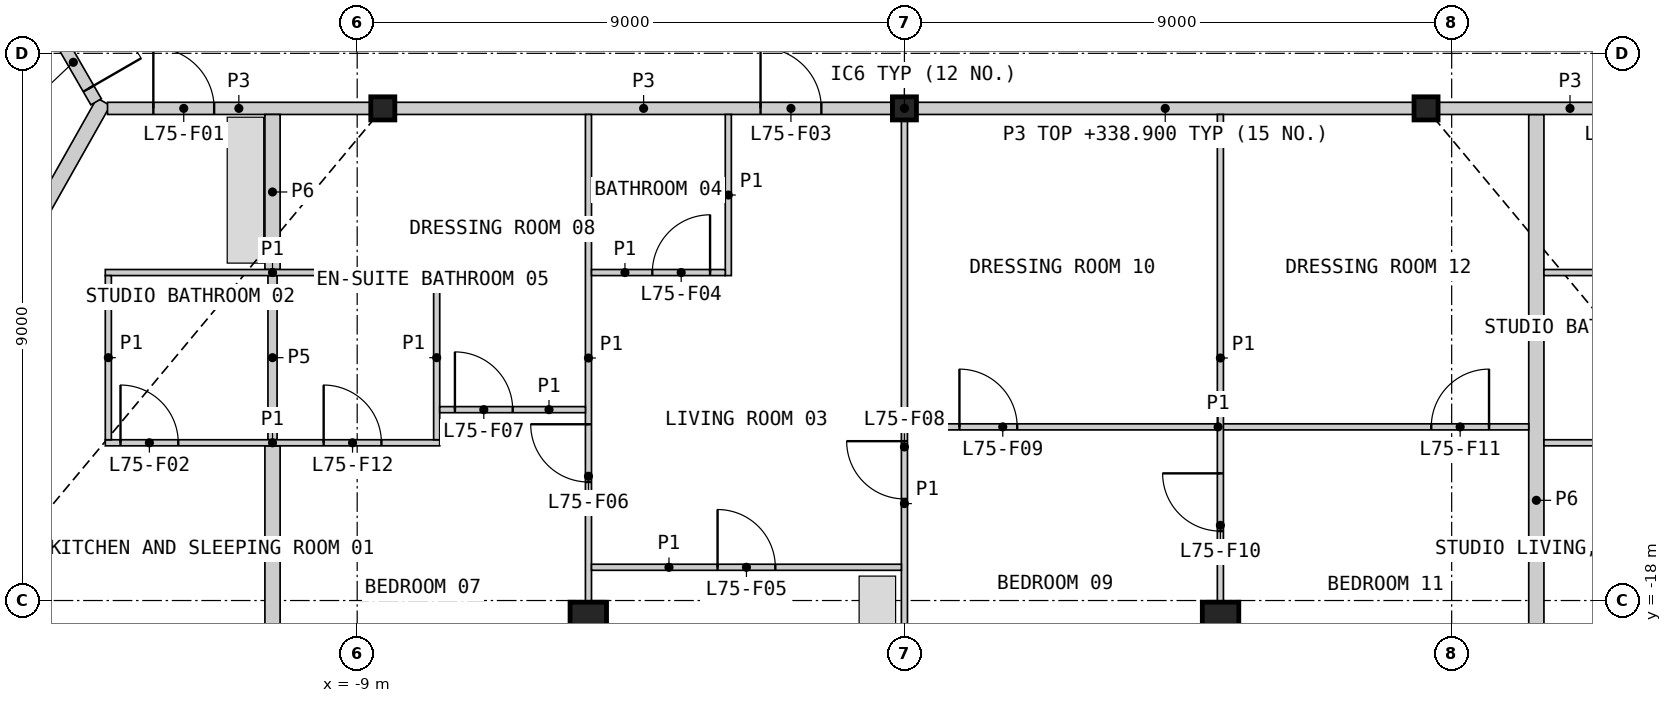
"""IFC4 building model, lengths in metres.
Left out: names, types, materials, properties, quantities, classifications, styles, units other than length and angle.
Written with IfcOpenShell. Run it as: python <this file> out.ifc"""

import sys

from ifc_helpers import new_model, si_unit, direction, frame, frame_2d, origin, origin_2d, place, context, subcontext, project, spatial, rectangle, hollow_rectangle, i_section, extrude, element, fill, save


model = new_model("IFC4")
c1 = context("Model", 3, precision=1e-05, world=origin(), true_north=direction((0.0, 1.0)))
c2 = subcontext(c1, "Body", "Model", "MODEL_VIEW")
j1 = project(units=[si_unit("LENGTHUNIT", "METRE"), si_unit("PLANEANGLEUNIT", "RADIAN")], contexts=[c1])
p1 = place(None, origin())
s1 = spatial("IfcSite", under=j1, at=p1, CompositionType="ELEMENT")
p2 = place(p1, origin())
s2 = spatial("IfcBuilding", under=s1, at=p2, CompositionType="ELEMENT")
p3 = place(p2, frame((0.0, 0.0, 335.8)))
s3 = spatial("IfcBuildingStorey", under=s2, at=p3, CompositionType="ELEMENT", Elevation=335.8)
for number, where, z_axis, x_axis in (
    (1, (-5.199, -18.327, 0.0), (0.0, 0.0, 1.0), (1.0, 0.0, 0.0)),
    (2, (5.199, -18.327, 0.0), (0.0, 0.0, 1.0), (1.0, 0.0, 0.0)),
):
    element("IfcColumn", number, at=place(p3, frame(where, z_axis=z_axis, x_axis=x_axis)), inside=s3, PredefinedType="COLUMN", context=c2, shape_type="SweptSolid", body=[
        extrude(hollow_rectangle(XDim=0.6, YDim=0.6, WallThickness=0.04, at=origin_2d()), origin(), (0.0, 0.0, 1.0), 3.4),
    ])
for number, where, z_axis, x_axis in (
    (3, (-8.578, -9.906, 0.0), (0.0, 0.0, 1.0), (1.0, 0.0, 0.0)),
    (4, (0.0, -9.906, 0.0), (0.0, 0.0, 1.0), (1.0, 0.0, 0.0)),
    (5, (8.578, -9.906, 0.0), (0.0, 0.0, 1.0), (1.0, 0.0, 0.0)),
):
    element("IfcColumn", number, at=place(p3, frame(where, z_axis=z_axis, x_axis=x_axis)), inside=s3, PredefinedType="COLUMN", context=c2, shape_type="SweptSolid", body=[
        extrude(i_section(OverallWidth=0.396, OverallDepth=0.381, WebThickness=0.019, FlangeThickness=0.03, at=origin_2d()), origin(), (0.0, 0.0, 1.0), 3.4),
    ])
p4 = place(p3, frame((-20.376, -22.582, 0.0), z_axis=(0.0, 0.0, 1.0), x_axis=(0.491057132664, 0.871127368678, 0.0)))
e6 = element("IfcWall", 6, at=p4, inside=s3, PredefinedType="PARTITIONING", context=c2, shape_type="SweptSolid", body=[
    extrude(rectangle(XDim=14.677, YDim=0.25, at=frame_2d((7.338, 0.0))), origin(), (0.0, 0.0, 1.0), 2.33),
])
p5 = place(p3, frame((10.393, -22.698, 0.0), z_axis=(0.0, 0.0, 1.0), x_axis=(0.0, 1.0, 0.0)))
e7 = element("IfcWall", 7, at=p5, inside=s3, PredefinedType="PARTITIONING", context=c2, shape_type="SweptSolid", body=[
    extrude(rectangle(XDim=12.692, YDim=0.25, at=frame_2d((6.346, 0.0))), origin(), (0.0, 0.0, 1.0), 2.33),
])
p6 = place(p3, frame((0.208, -9.906, 0.0), z_axis=(0.0, 0.0, 1.0), x_axis=(1.0, 0.0, 0.0)))
e8 = element("IfcWall", 8, at=p6, inside=s3, PredefinedType="PARTITIONING", context=c2, shape_type="SweptSolid", body=[
    extrude(rectangle(XDim=8.163, YDim=0.2, at=frame_2d((4.082, 0.0))), origin(), (0.0, 0.0, 1.0), 3.1),
])
p7 = place(p3, frame((-8.371, -9.906, 0.0), z_axis=(0.0, 0.0, 1.0), x_axis=(1.0, 0.0, 0.0)))
e9 = element("IfcWall", 9, at=p7, inside=s3, PredefinedType="PARTITIONING", context=c2, shape_type="SweptSolid", body=[
    extrude(rectangle(XDim=8.163, YDim=0.2, at=frame_2d((4.082, 0.0))), origin(), (0.0, 0.0, 1.0), 3.1),
])
p8 = place(p7, frame((6.004, 0.0, 0.0)))
e10 = element("IfcOpeningElement", 10, at=p8, cuts=e9, PredefinedType="OPENING", context=c2, shape_type="SweptSolid", body=[
    extrude(rectangle(XDim=1.0, YDim=2.1, at=frame_2d((0.5, 1.05))), frame((0.0, 0.11, 0.0), z_axis=(0.0, -1.0, 0.0), x_axis=(1.0, 0.0, 0.0)), (0.0, 0.0, 1.0), 0.22),
])
p9 = place(p3, frame((-10.393, -22.698, 0.0), z_axis=(0.0, 0.0, 1.0), x_axis=(0.0, 1.0, 0.0)))
e11 = element("IfcWall", 11, at=p9, inside=s3, PredefinedType="PARTITIONING", context=c2, shape_type="SweptSolid", body=[
    extrude(rectangle(XDim=7.242, YDim=0.25, at=frame_2d((3.621, 0.0))), origin(), (0.0, 0.0, 1.0), 2.33),
])
p10 = place(p3, frame((-13.106, -9.906, 0.0), z_axis=(0.0, 0.0, 1.0), x_axis=(1.0, 0.0, 0.0)))
e12 = element("IfcWall", 12, at=p10, inside=s3, PredefinedType="PARTITIONING", context=c2, shape_type="SweptSolid", body=[
    extrude(rectangle(XDim=4.32, YDim=0.2, at=frame_2d((2.16, 0.0))), origin(), (0.0, 0.0, 1.0), 3.1),
])
p11 = place(p10, frame((0.753, 0.0, 0.0)))
e13 = element("IfcOpeningElement", 13, at=p11, cuts=e12, PredefinedType="OPENING", context=c2, shape_type="SweptSolid", body=[
    extrude(rectangle(XDim=1.0, YDim=2.1, at=frame_2d((0.5, 1.05))), frame((0.0, 0.11, 0.0), z_axis=(0.0, -1.0, 0.0), x_axis=(1.0, 0.0, 0.0)), (0.0, 0.0, 1.0), 0.22),
])
p12 = place(p3, frame((8.786, -9.906, 0.0), z_axis=(0.0, 0.0, 1.0), x_axis=(1.0, 0.0, 0.0)))
e14 = element("IfcWall", 14, at=p12, inside=s3, PredefinedType="PARTITIONING", context=c2, shape_type="SweptSolid", body=[
    extrude(rectangle(XDim=4.32, YDim=0.2, at=frame_2d((2.16, 0.0))), origin(), (0.0, 0.0, 1.0), 3.1),
])
p13 = place(p12, frame((2.566, 0.0, 0.0)))
e15 = element("IfcOpeningElement", 15, at=p13, cuts=e14, PredefinedType="OPENING", context=c2, shape_type="SweptSolid", body=[
    extrude(rectangle(XDim=1.0, YDim=2.1, at=frame_2d((0.5, 1.05))), frame((0.0, 0.11, 0.0), z_axis=(0.0, -1.0, 0.0), x_axis=(1.0, 0.0, 0.0)), (0.0, 0.0, 1.0), 0.22),
])
p14 = place(p3, frame((-15.131, -6.614, 0.0), z_axis=(0.0, 0.0, 1.0), x_axis=(0.499967746641, -0.866044024469, 0.0)))
e16 = element("IfcWall", 16, at=p14, inside=s3, PredefinedType="PARTITIONING", context=c2, shape_type="SweptSolid", body=[
    extrude(rectangle(XDim=3.676, YDim=0.2, at=frame_2d((1.838, 0.0))), origin(), (0.0, 0.0, 1.0), 3.1),
])
p15 = place(p14, frame((2.426, 0.0, 0.0)))
e17 = element("IfcOpeningElement", 17, at=p15, cuts=e16, PredefinedType="OPENING", context=c2, shape_type="SweptSolid", body=[
    extrude(rectangle(XDim=1.0, YDim=2.1, at=frame_2d((0.5, 1.05))), frame((0.0, 0.11, 0.0), z_axis=(0.0, -1.0, 0.0), x_axis=(1.0, 0.0, 0.0)), (0.0, 0.0, 1.0), 0.22),
])
p16 = place(p3, frame((-10.393, -12.556, 0.0), z_axis=(0.0, 0.0, 1.0), x_axis=(0.0, 1.0, 0.0)))
e18 = element("IfcWall", 18, at=p16, inside=s3, PredefinedType="PARTITIONING", context=c2, shape_type="SweptSolid", body=[
    extrude(rectangle(XDim=2.55, YDim=0.25, at=frame_2d((1.275, 0.0))), origin(), (0.0, 0.0, 1.0), 2.33),
])
p17 = place(p3, frame((-10.393, -15.356, 0.0), z_axis=(0.0, 0.0, 1.0), x_axis=(0.0, 1.0, 0.0)))
e19 = element("IfcWall", 19, at=p17, inside=s3, PredefinedType="PLUMBINGWALL", context=c2, shape_type="SweptSolid", body=[
    extrude(rectangle(XDim=2.7, YDim=0.15, at=frame_2d((1.35, 0.0))), origin(), (0.0, 0.0, 1.0), 2.33),
])
p18 = place(p3, frame((0.0, -22.698, 0.0), z_axis=(0.0, 0.0, 1.0), x_axis=(0.0, 1.0, 0.0)))
e20 = element("IfcWall", 20, at=p18, inside=s3, PredefinedType="PARTITIONING", context=c2, shape_type="SweptSolid", body=[
    extrude(rectangle(XDim=12.585, YDim=0.1, at=frame_2d((6.292, 0.0))), origin(), (0.0, 0.0, 1.0), 2.33),
])
p19 = place(p18, frame((6.369, 0.0, 0.0)))
e21 = element("IfcOpeningElement", 21, at=p19, cuts=e20, PredefinedType="OPENING", context=c2, shape_type="SweptSolid", body=[
    extrude(rectangle(XDim=0.95, YDim=2.1, at=frame_2d((0.475, 1.05))), frame((0.0, 0.06, 0.0), z_axis=(0.0, -1.0, 0.0), x_axis=(1.0, 0.0, 0.0)), (0.0, 0.0, 1.0), 0.12),
])
p20 = place(p3, frame((0.05, -15.144, 0.0), z_axis=(0.0, 0.0, 1.0), x_axis=(1.0, 0.0, 0.0)))
e22 = element("IfcWall", 22, at=p20, inside=s3, PredefinedType="PARTITIONING", context=c2, shape_type="SweptSolid", body=[
    extrude(rectangle(XDim=10.218, YDim=0.1, at=frame_2d((5.109, 0.0))), origin(), (0.0, 0.0, 1.0), 2.33),
])
p21 = place(p20, frame((0.855, 0.0, 0.0)))
e23 = element("IfcOpeningElement", 23, at=p21, cuts=e22, PredefinedType="OPENING", context=c2, shape_type="SweptSolid", body=[
    extrude(rectangle(XDim=0.95, YDim=2.1, at=frame_2d((0.475, 1.05))), frame((0.0, 0.06, 0.0), z_axis=(0.0, -1.0, 0.0), x_axis=(1.0, 0.0, 0.0)), (0.0, 0.0, 1.0), 0.12),
])
p22 = place(p20, frame((8.615, 0.0, 0.0)))
e24 = element("IfcOpeningElement", 24, at=p22, cuts=e22, PredefinedType="OPENING", context=c2, shape_type="SweptSolid", body=[
    extrude(rectangle(XDim=0.95, YDim=2.1, at=frame_2d((0.475, 1.05))), frame((0.0, 0.06, 0.0), z_axis=(0.0, -1.0, 0.0), x_axis=(1.0, 0.0, 0.0)), (0.0, 0.0, 1.0), 0.12),
])
p23 = place(p3, frame((-5.196, -18.017, 0.0), z_axis=(0.0, 0.0, 1.0), x_axis=(0.0, 1.0, 0.0)))
e25 = element("IfcWall", 25, at=p23, inside=s3, PredefinedType="PARTITIONING", context=c2, shape_type="SweptSolid", body=[
    extrude(rectangle(XDim=8.011, YDim=0.1, at=frame_2d((4.006, 0.0))), origin(), (0.0, 0.0, 1.0), 2.33),
])
p24 = place(p23, frame((1.966, 0.0, 0.0)))
e26 = element("IfcOpeningElement", 26, at=p24, cuts=e25, PredefinedType="OPENING", context=c2, shape_type="SweptSolid", body=[
    extrude(rectangle(XDim=0.95, YDim=2.1, at=frame_2d((0.475, 1.05))), frame((0.0, 0.06, 0.0), z_axis=(0.0, -1.0, 0.0), x_axis=(1.0, 0.0, 0.0)), (0.0, 0.0, 1.0), 0.12),
])
p25 = place(p3, frame((5.196, -18.017, 0.0), z_axis=(0.0, 0.0, 1.0), x_axis=(0.0, 1.0, 0.0)))
e27 = element("IfcWall", 27, at=p25, inside=s3, PredefinedType="PARTITIONING", context=c2, shape_type="SweptSolid", body=[
    extrude(rectangle(XDim=8.011, YDim=0.1, at=frame_2d((4.006, 0.0))), origin(), (0.0, 0.0, 1.0), 2.33),
])
p26 = place(p25, frame((1.158, 0.0, 0.0)))
e28 = element("IfcOpeningElement", 28, at=p26, cuts=e27, PredefinedType="OPENING", context=c2, shape_type="SweptSolid", body=[
    extrude(rectangle(XDim=0.95, YDim=2.1, at=frame_2d((0.475, 1.05))), frame((0.0, 0.06, 0.0), z_axis=(0.0, -1.0, 0.0), x_axis=(1.0, 0.0, 0.0)), (0.0, 0.0, 1.0), 0.12),
])
p27 = place(p3, frame((-13.143, -12.606, 0.0), z_axis=(0.0, 0.0, 1.0), x_axis=(1.0, 0.0, 0.0)))
e29 = element("IfcWall", 29, at=p27, inside=s3, PredefinedType="PARTITIONING", context=c2, shape_type="SweptSolid", body=[
    extrude(rectangle(XDim=5.5, YDim=0.1, at=frame_2d((2.75, 0.0))), origin(), (0.0, 0.0, 1.0), 2.33),
])
p28 = place(p3, frame((-13.143, -15.406, 0.0), z_axis=(0.0, 0.0, 1.0), x_axis=(1.0, 0.0, 0.0)))
e30 = element("IfcWall", 30, at=p28, inside=s3, PredefinedType="PARTITIONING", context=c2, shape_type="SweptSolid", body=[
    extrude(rectangle(XDim=5.5, YDim=0.1, at=frame_2d((2.75, 0.0))), origin(), (0.0, 0.0, 1.0), 2.33),
])
p29 = place(p28, frame((0.25, 0.0, 0.0)))
e31 = element("IfcOpeningElement", 31, at=p29, cuts=e30, PredefinedType="OPENING", context=c2, shape_type="SweptSolid", body=[
    extrude(rectangle(XDim=0.95, YDim=2.1, at=frame_2d((0.475, 1.05))), frame((0.0, 0.06, 0.0), z_axis=(0.0, -1.0, 0.0), x_axis=(1.0, 0.0, 0.0)), (0.0, 0.0, 1.0), 0.12),
])
p30 = place(p28, frame((3.591, 0.0, 0.0)))
e32 = element("IfcOpeningElement", 32, at=p30, cuts=e30, PredefinedType="OPENING", context=c2, shape_type="SweptSolid", body=[
    extrude(rectangle(XDim=0.95, YDim=2.1, at=frame_2d((0.475, 1.05))), frame((0.0, 0.06, 0.0), z_axis=(0.0, -1.0, 0.0), x_axis=(1.0, 0.0, 0.0)), (0.0, 0.0, 1.0), 0.12),
])
p31 = place(p3, frame((-5.146, -17.453, 0.0), z_axis=(0.0, 0.0, 1.0), x_axis=(1.0, 0.0, 0.0)))
e33 = element("IfcWall", 33, at=p31, inside=s3, PredefinedType="PARTITIONING", context=c2, shape_type="SweptSolid", body=[
    extrude(rectangle(XDim=5.096, YDim=0.1, at=frame_2d((2.548, 0.0))), origin(), (0.0, 0.0, 1.0), 2.33),
])
p32 = place(p31, frame((2.073, 0.0, 0.0)))
e34 = element("IfcOpeningElement", 34, at=p32, cuts=e33, PredefinedType="OPENING", context=c2, shape_type="SweptSolid", body=[
    extrude(rectangle(XDim=0.95, YDim=2.1, at=frame_2d((0.475, 1.05))), frame((0.0, 0.06, 0.0), z_axis=(0.0, -1.0, 0.0), x_axis=(1.0, 0.0, 0.0)), (0.0, 0.0, 1.0), 0.12),
])
for number, where, z_axis, x_axis in (
    (35, (-13.093, -15.356, 0.0), (0.0, 0.0, 1.0), (0.0, 1.0, 0.0)),
    (36, (-7.692, -15.356, 0.0), (0.0, 0.0, 1.0), (0.0, 1.0, 0.0)),
):
    element("IfcWall", number, at=place(p3, frame(where, z_axis=z_axis, x_axis=x_axis)), inside=s3, PredefinedType="PARTITIONING", context=c2, shape_type="SweptSolid", body=[
        extrude(rectangle(XDim=2.7, YDim=0.1, at=frame_2d((1.35, 0.0))), origin(), (0.0, 0.0, 1.0), 2.33),
    ])
p33 = place(p3, frame((-2.896, -12.656, 0.0), z_axis=(0.0, 0.0, 1.0), x_axis=(0.0, 1.0, 0.0)))
e37 = element("IfcWall", 37, at=p33, inside=s3, PredefinedType="PARTITIONING", context=c2, shape_type="SweptSolid", body=[
    extrude(rectangle(XDim=2.65, YDim=0.1, at=frame_2d((1.325, 0.0))), origin(), (0.0, 0.0, 1.0), 2.33),
])
p34 = place(p3, frame((10.518, -12.606, 0.0), z_axis=(0.0, 0.0, 1.0), x_axis=(1.0, 0.0, 0.0)))
e38 = element("IfcWall", 38, at=p34, inside=s3, PredefinedType="PARTITIONING", context=c2, shape_type="SweptSolid", body=[
    extrude(rectangle(XDim=2.525, YDim=0.1, at=frame_2d((1.262, 0.0))), origin(), (0.0, 0.0, 1.0), 2.33),
])
p35 = place(p3, frame((10.518, -15.406, 0.0), z_axis=(0.0, 0.0, 1.0), x_axis=(1.0, 0.0, 0.0)))
e39 = element("IfcWall", 39, at=p35, inside=s3, PredefinedType="PARTITIONING", context=c2, shape_type="SweptSolid", body=[
    extrude(rectangle(XDim=2.525, YDim=0.1, at=frame_2d((1.262, 0.0))), origin(), (0.0, 0.0, 1.0), 2.33),
])
p36 = place(p35, frame((1.325, 0.0, 0.0)))
e40 = element("IfcOpeningElement", 40, at=p36, cuts=e39, PredefinedType="OPENING", context=c2, shape_type="SweptSolid", body=[
    extrude(rectangle(XDim=0.95, YDim=2.1, at=frame_2d((0.475, 1.05))), frame((0.0, 0.06, 0.0), z_axis=(0.0, -1.0, 0.0), x_axis=(1.0, 0.0, 0.0)), (0.0, 0.0, 1.0), 0.12),
])
p37 = place(p3, frame((-7.643, -14.861, 0.0), z_axis=(0.0, 0.0, 1.0), x_axis=(1.0, 0.0, 0.0)))
e41 = element("IfcWall", 41, at=p37, inside=s3, PredefinedType="PARTITIONING", context=c2, shape_type="SweptSolid", body=[
    extrude(rectangle(XDim=2.396, YDim=0.1, at=frame_2d((1.198, 0.0))), origin(), (0.0, 0.0, 1.0), 2.33),
])
p38 = place(p37, frame((0.25, 0.0, 0.0)))
e42 = element("IfcOpeningElement", 42, at=p38, cuts=e41, PredefinedType="OPENING", context=c2, shape_type="SweptSolid", body=[
    extrude(rectangle(XDim=0.95, YDim=2.1, at=frame_2d((0.475, 1.05))), frame((0.0, 0.06, 0.0), z_axis=(0.0, -1.0, 0.0), x_axis=(1.0, 0.0, 0.0)), (0.0, 0.0, 1.0), 0.12),
])
p39 = place(p3, frame((-5.146, -12.606, 0.0), z_axis=(0.0, 0.0, 1.0), x_axis=(1.0, 0.0, 0.0)))
e43 = element("IfcWall", 43, at=p39, inside=s3, PredefinedType="PARTITIONING", context=c2, shape_type="SweptSolid", body=[
    extrude(rectangle(XDim=2.2, YDim=0.1, at=frame_2d((1.1, 0.0))), origin(), (0.0, 0.0, 1.0), 2.33),
])
p40 = place(p39, frame((1.0, 0.0, 0.0)))
e44 = element("IfcOpeningElement", 44, at=p40, cuts=e43, PredefinedType="OPENING", context=c2, shape_type="SweptSolid", body=[
    extrude(rectangle(XDim=0.95, YDim=2.1, at=frame_2d((0.475, 1.05))), frame((0.0, 0.06, 0.0), z_axis=(0.0, -1.0, 0.0), x_axis=(1.0, 0.0, 0.0)), (0.0, 0.0, 1.0), 0.12),
])
p41 = place(p11, origin())
e45 = element("IfcDoor", 45, at=p41, inside=s3, OperationType="SINGLE_SWING_LEFT", PredefinedType="DOOR", context=c2, shape_type="SweptSolid", body=[
    extrude(rectangle(XDim=1.0, YDim=2.1, at=frame_2d((0.5, 1.05))), frame((0.0, 0.025, 0.0), z_axis=(0.0, -1.0, 0.0), x_axis=(1.0, 0.0, 0.0)), (0.0, 0.0, 1.0), 0.05),
])
fill(e13, e45)
p42 = place(p29, origin())
e46 = element("IfcDoor", 46, at=p42, inside=s3, OperationType="SINGLE_SWING_LEFT", PredefinedType="DOOR", context=c2, shape_type="SweptSolid", body=[
    extrude(rectangle(XDim=0.95, YDim=2.1, at=frame_2d((0.475, 1.05))), frame((0.0, 0.025, 0.0), z_axis=(0.0, -1.0, 0.0), x_axis=(1.0, 0.0, 0.0)), (0.0, 0.0, 1.0), 0.05),
])
fill(e31, e46)
p43 = place(p8, origin())
e47 = element("IfcDoor", 47, at=p43, inside=s3, OperationType="SINGLE_SWING_LEFT", PredefinedType="DOOR", context=c2, shape_type="SweptSolid", body=[
    extrude(rectangle(XDim=1.0, YDim=2.1, at=frame_2d((0.5, 1.05))), frame((0.0, 0.025, 0.0), z_axis=(0.0, -1.0, 0.0), x_axis=(1.0, 0.0, 0.0)), (0.0, 0.0, 1.0), 0.05),
])
fill(e10, e47)
p44 = place(p40, origin())
e48 = element("IfcDoor", 48, at=p44, inside=s3, OperationType="SINGLE_SWING_RIGHT", PredefinedType="DOOR", context=c2, shape_type="SweptSolid", body=[
    extrude(rectangle(XDim=0.95, YDim=2.1, at=frame_2d((0.475, 1.05))), frame((0.0, 0.025, 0.0), z_axis=(0.0, -1.0, 0.0), x_axis=(1.0, 0.0, 0.0)), (0.0, 0.0, 1.0), 0.05),
])
fill(e44, e48)
p45 = place(p32, origin())
e49 = element("IfcDoor", 49, at=p45, inside=s3, OperationType="SINGLE_SWING_LEFT", PredefinedType="DOOR", context=c2, shape_type="SweptSolid", body=[
    extrude(rectangle(XDim=0.95, YDim=2.1, at=frame_2d((0.475, 1.05))), frame((0.0, 0.025, 0.0), z_axis=(0.0, -1.0, 0.0), x_axis=(1.0, 0.0, 0.0)), (0.0, 0.0, 1.0), 0.05),
])
fill(e34, e49)
p46 = place(p24, origin())
e50 = element("IfcDoor", 50, at=p46, inside=s3, OperationType="SINGLE_SWING_RIGHT", PredefinedType="DOOR", context=c2, shape_type="SweptSolid", body=[
    extrude(rectangle(XDim=0.95, YDim=2.1, at=frame_2d((0.475, 1.05))), frame((0.0, 0.025, 0.0), z_axis=(0.0, -1.0, 0.0), x_axis=(1.0, 0.0, 0.0)), (0.0, 0.0, 1.0), 0.05),
])
fill(e26, e50)
p47 = place(p38, origin())
e51 = element("IfcDoor", 51, at=p47, inside=s3, OperationType="SINGLE_SWING_LEFT", PredefinedType="DOOR", context=c2, shape_type="SweptSolid", body=[
    extrude(rectangle(XDim=0.95, YDim=2.1, at=frame_2d((0.475, 1.05))), frame((0.0, 0.025, 0.0), z_axis=(0.0, -1.0, 0.0), x_axis=(1.0, 0.0, 0.0)), (0.0, 0.0, 1.0), 0.05),
])
fill(e42, e51)
p48 = place(p19, origin())
e52 = element("IfcDoor", 52, at=p48, inside=s3, OperationType="SINGLE_SWING_RIGHT", PredefinedType="DOOR", context=c2, shape_type="SweptSolid", body=[
    extrude(rectangle(XDim=0.95, YDim=2.1, at=frame_2d((0.475, 1.05))), frame((0.0, 0.025, 0.0), z_axis=(0.0, -1.0, 0.0), x_axis=(1.0, 0.0, 0.0)), (0.0, 0.0, 1.0), 0.05),
])
fill(e21, e52)
p49 = place(p21, origin())
e53 = element("IfcDoor", 53, at=p49, inside=s3, OperationType="SINGLE_SWING_LEFT", PredefinedType="DOOR", context=c2, shape_type="SweptSolid", body=[
    extrude(rectangle(XDim=0.95, YDim=2.1, at=frame_2d((0.475, 1.05))), frame((0.0, 0.025, 0.0), z_axis=(0.0, -1.0, 0.0), x_axis=(1.0, 0.0, 0.0)), (0.0, 0.0, 1.0), 0.05),
])
fill(e23, e53)
p50 = place(p26, origin())
e54 = element("IfcDoor", 54, at=p50, inside=s3, OperationType="SINGLE_SWING_RIGHT", PredefinedType="DOOR", context=c2, shape_type="SweptSolid", body=[
    extrude(rectangle(XDim=0.95, YDim=2.1, at=frame_2d((0.475, 1.05))), frame((0.0, 0.025, 0.0), z_axis=(0.0, -1.0, 0.0), x_axis=(1.0, 0.0, 0.0)), (0.0, 0.0, 1.0), 0.05),
])
fill(e28, e54)
p51 = place(p22, origin())
e55 = element("IfcDoor", 55, at=p51, inside=s3, OperationType="SINGLE_SWING_RIGHT", PredefinedType="DOOR", context=c2, shape_type="SweptSolid", body=[
    extrude(rectangle(XDim=0.95, YDim=2.1, at=frame_2d((0.475, 1.05))), frame((0.0, 0.025, 0.0), z_axis=(0.0, -1.0, 0.0), x_axis=(1.0, 0.0, 0.0)), (0.0, 0.0, 1.0), 0.05),
])
fill(e24, e55)
p52 = place(p30, origin())
e56 = element("IfcDoor", 56, at=p52, inside=s3, OperationType="SINGLE_SWING_LEFT", PredefinedType="DOOR", context=c2, shape_type="SweptSolid", body=[
    extrude(rectangle(XDim=0.95, YDim=2.1, at=frame_2d((0.475, 1.05))), frame((0.0, 0.025, 0.0), z_axis=(0.0, -1.0, 0.0), x_axis=(1.0, 0.0, 0.0)), (0.0, 0.0, 1.0), 0.05),
])
fill(e32, e56)
p53 = place(p15, origin())
e57 = element("IfcDoor", 57, at=p53, inside=s3, OperationType="SINGLE_SWING_RIGHT", PredefinedType="DOOR", context=c2, shape_type="SweptSolid", body=[
    extrude(rectangle(XDim=1.0, YDim=2.1, at=frame_2d((0.5, 1.05))), frame((0.0, 0.025, 0.0), z_axis=(0.0, -1.0, 0.0), x_axis=(1.0, 0.0, 0.0)), (0.0, 0.0, 1.0), 0.05),
])
fill(e17, e57)
save(model, sys.argv[1])
